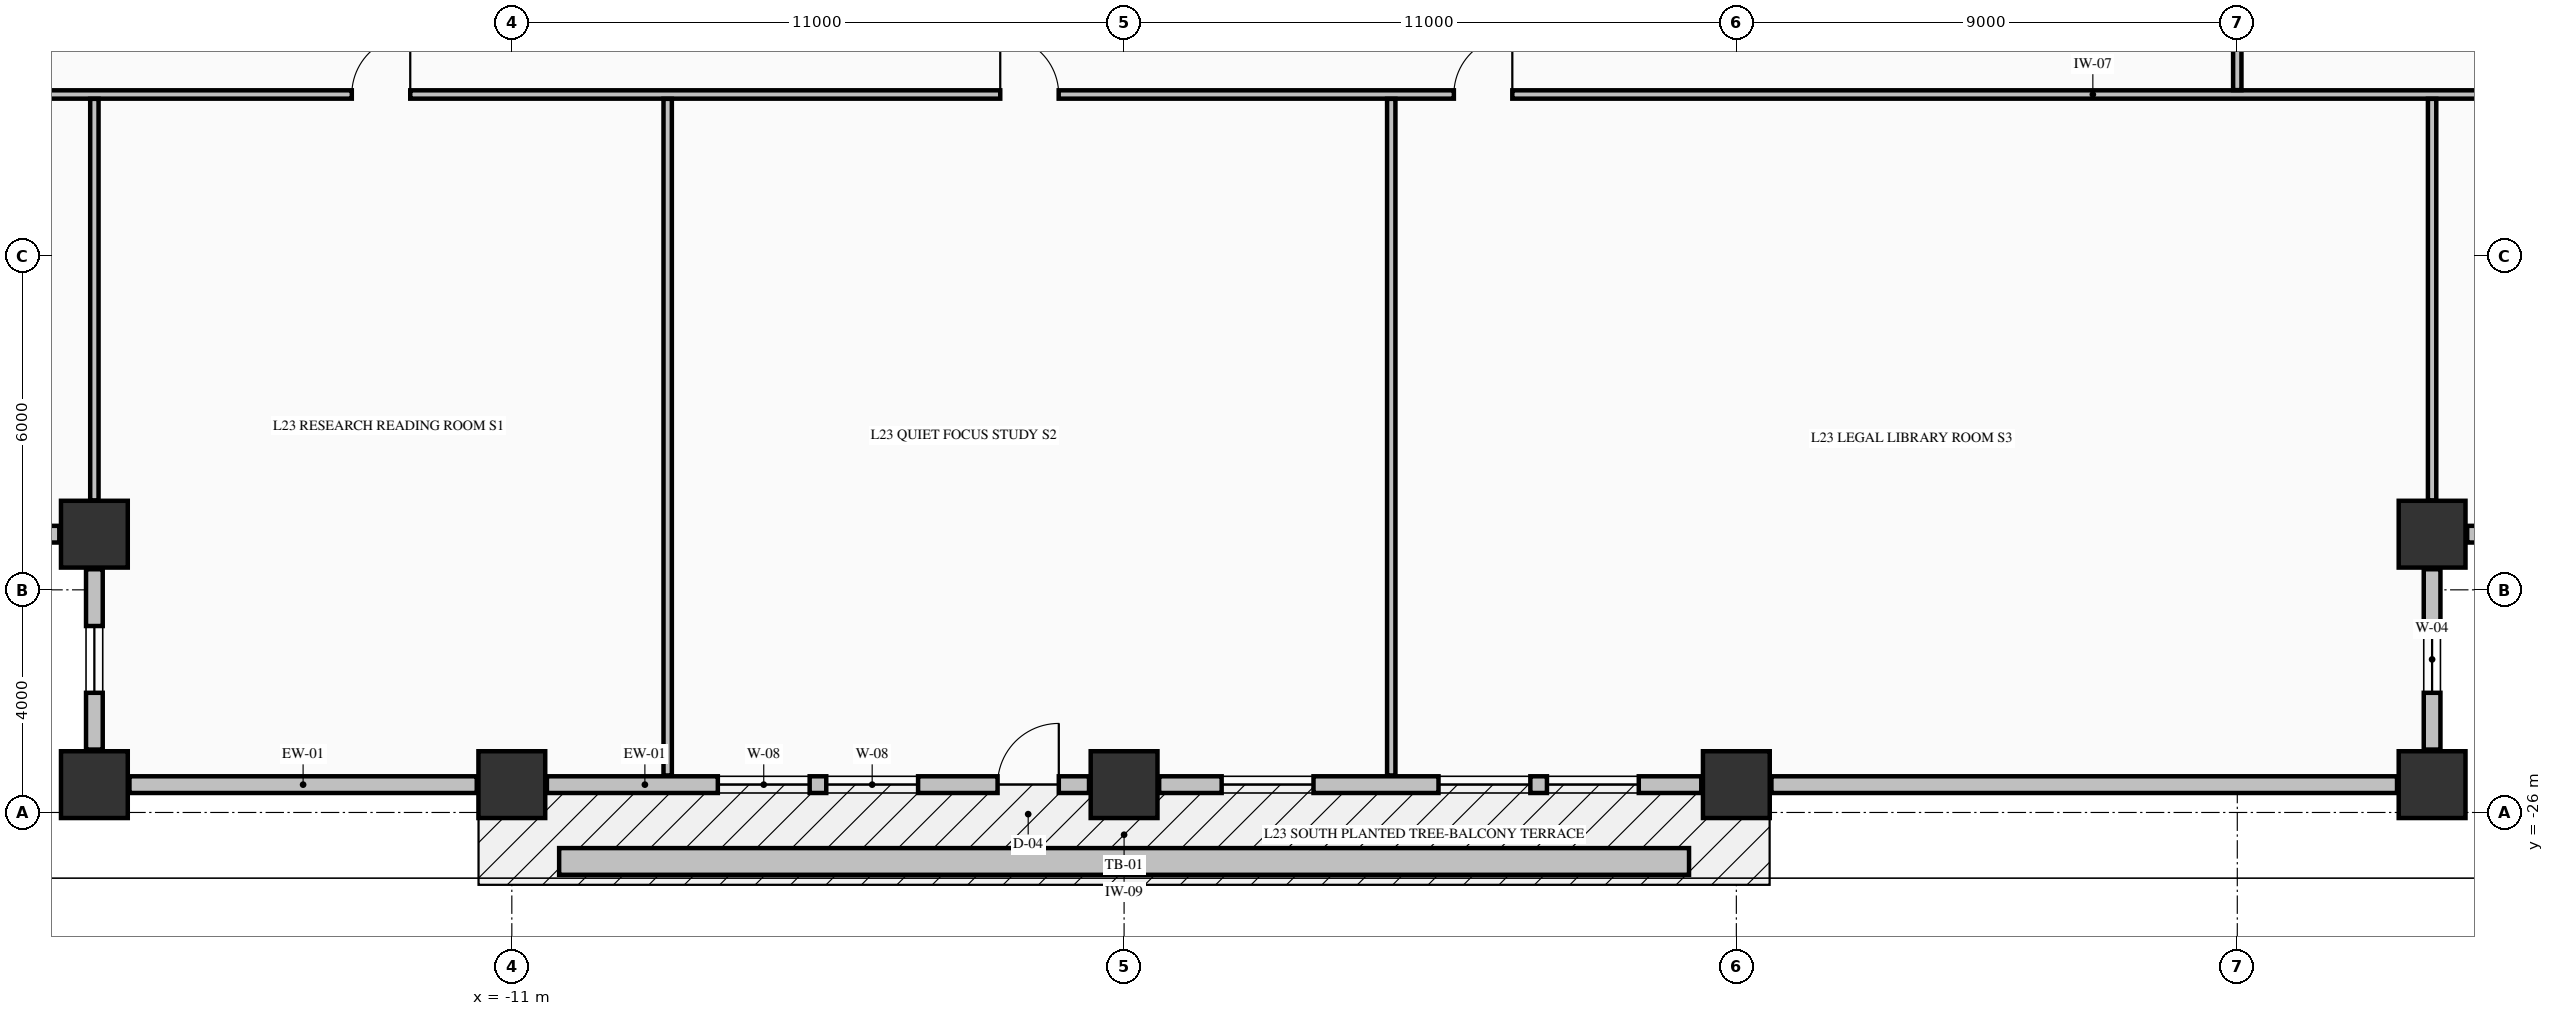
"""IFC4 building model, lengths in metres.
Left out: names, types, materials, properties, quantities, classifications, styles, units other than length and angle.
Written with IfcOpenShell. Run it as: python <this file> out.ifc"""

import sys

from ifc_helpers import new_model, si_unit, direction, frame, frame_2d, origin, origin_2d, place, context, subcontext, project, spatial, rectangle, extrude, element, fill, save


model = new_model("IFC4")
c1 = context("Model", 3, precision=1e-05, world=origin(), true_north=direction((0.0, 1.0)))
c2 = subcontext(c1, "Body", "Model", "MODEL_VIEW")
j1 = project(units=[si_unit("LENGTHUNIT", "METRE"), si_unit("PLANEANGLEUNIT", "RADIAN")], contexts=[c1])
p1 = place(None, origin())
s1 = spatial("IfcSite", under=j1, at=p1, CompositionType="ELEMENT")
p2 = place(p1, origin())
s2 = spatial("IfcBuilding", under=s1, at=p2, CompositionType="ELEMENT")
p3 = place(p2, frame((0.0, 0.0, 94.93)))
s3 = spatial("IfcBuildingStorey", under=s2, at=p3, CompositionType="ELEMENT", Elevation=94.93)
for number, where, z_axis, x_axis in (
    (1, (-18.5, -25.5, -0.25), (0.0, 0.0, 1.0), (1.0, 0.0, 0.0)),
    (2, (-11.0, -25.5, -0.25), (0.0, 0.0, 1.0), (1.0, 0.0, 0.0)),
    (3, (0.0, -25.5, -0.25), (0.0, 0.0, 1.0), (1.0, 0.0, 0.0)),
    (4, (11.0, -25.5, -0.25), (0.0, 0.0, 1.0), (1.0, 0.0, 0.0)),
    (5, (23.5, -25.5, -0.25), (0.0, 0.0, 1.0), (1.0, 0.0, 0.0)),
    (6, (-18.5, -21.0, -0.25), (0.0, 0.0, 1.0), (1.0, 0.0, 0.0)),
    (7, (23.5, -21.0, -0.25), (0.0, 0.0, 1.0), (1.0, 0.0, 0.0)),
):
    element("IfcColumn", number, at=place(p3, frame(where, z_axis=z_axis, x_axis=x_axis)), inside=s3, PredefinedType="COLUMN", context=c2, shape_type="SweptSolid", body=[
        extrude(rectangle(XDim=1.2, YDim=1.2, at=origin_2d()), origin(), (0.0, 0.0, 1.0), 3.545),
    ])
p4 = place(p3, frame((23.5, -24.87, 0.0), z_axis=(0.0, 0.0, 1.0), x_axis=(0.0, 1.0, 0.0)))
e8 = element("IfcWall", 8, at=p4, inside=s3, PredefinedType="STANDARD", context=c2, shape_type="SweptSolid", body=[
    extrude(rectangle(XDim=3.24, YDim=0.3, at=frame_2d((1.62, 0.0))), origin(), (0.0, 0.0, 1.0), 2.687),
])
p5 = place(p4, frame((1.02, 0.0, 0.82)))
e9 = element("IfcOpeningElement", 9, at=p5, cuts=e8, PredefinedType="OPENING", context=c2, shape_type="SweptSolid", body=[
    extrude(rectangle(XDim=1.2, YDim=1.65, at=frame_2d((0.6, 0.825))), frame((0.0, 0.16, 0.0), z_axis=(0.0, -1.0, 0.0), x_axis=(1.0, 0.0, 0.0)), (0.0, 0.0, 1.0), 0.32),
])
p6 = place(p3, frame((24.13, -21.0, 0.0), z_axis=(0.0, 0.0, 1.0), x_axis=(1.0, 0.0, 0.0)))
e10 = element("IfcWall", 10, at=p6, inside=s3, PredefinedType="STANDARD", context=c2, shape_type="SweptSolid", body=[
    extrude(rectangle(XDim=3.24, YDim=0.3, at=frame_2d((1.62, 0.0))), origin(), (0.0, 0.0, 1.0), 2.687),
])
p7 = place(p6, frame((1.02, 0.0, 0.82)))
e11 = element("IfcOpeningElement", 11, at=p7, cuts=e10, PredefinedType="OPENING", context=c2, shape_type="SweptSolid", body=[
    extrude(rectangle(XDim=1.2, YDim=1.65, at=frame_2d((0.6, 0.825))), frame((0.0, 0.16, 0.0), z_axis=(0.0, -1.0, 0.0), x_axis=(1.0, 0.0, 0.0)), (0.0, 0.0, 1.0), 0.32),
])
p8 = place(p3, frame((-22.37, -21.0, 0.0), z_axis=(0.0, 0.0, 1.0), x_axis=(1.0, 0.0, 0.0)))
e12 = element("IfcWall", 12, at=p8, inside=s3, PredefinedType="STANDARD", context=c2, shape_type="SweptSolid", body=[
    extrude(rectangle(XDim=3.24, YDim=0.3, at=frame_2d((1.62, 0.0))), origin(), (0.0, 0.0, 1.0), 2.687),
])
p9 = place(p8, frame((1.02, 0.0, 0.82)))
e13 = element("IfcOpeningElement", 13, at=p9, cuts=e12, PredefinedType="OPENING", context=c2, shape_type="SweptSolid", body=[
    extrude(rectangle(XDim=1.2, YDim=1.65, at=frame_2d((0.6, 0.825))), frame((0.0, 0.16, 0.0), z_axis=(0.0, -1.0, 0.0), x_axis=(1.0, 0.0, 0.0)), (0.0, 0.0, 1.0), 0.32),
])
p10 = place(p3, frame((-18.5, -21.63, 0.0), z_axis=(0.0, 0.0, 1.0), x_axis=(0.0, -1.0, 0.0)))
e14 = element("IfcWall", 14, at=p10, inside=s3, PredefinedType="STANDARD", context=c2, shape_type="SweptSolid", body=[
    extrude(rectangle(XDim=3.24, YDim=0.3, at=frame_2d((1.62, 0.0))), origin(), (0.0, 0.0, 1.0), 2.687),
])
p11 = place(p10, frame((1.02, 0.0, 0.82)))
e15 = element("IfcOpeningElement", 15, at=p11, cuts=e14, PredefinedType="OPENING", context=c2, shape_type="SweptSolid", body=[
    extrude(rectangle(XDim=1.2, YDim=1.65, at=frame_2d((0.6, 0.825))), frame((0.0, 0.16, 0.0), z_axis=(0.0, -1.0, 0.0), x_axis=(1.0, 0.0, 0.0)), (0.0, 0.0, 1.0), 0.32),
])
p12 = place(p3, frame((-17.87, -25.5, 0.0), z_axis=(0.0, 0.0, 1.0), x_axis=(1.0, 0.0, 0.0)))
e16 = element("IfcWall", 16, at=p12, inside=s3, PredefinedType="STANDARD", context=c2, shape_type="SweptSolid", body=[
    extrude(rectangle(XDim=6.24, YDim=0.3, at=frame_2d((3.12, 0.0))), origin(), (0.0, 0.0, 1.0), 2.687),
])
p13 = place(p3, frame((-10.37, -25.5, 0.0), z_axis=(0.0, 0.0, 1.0), x_axis=(1.0, 0.0, 0.0)))
e17 = element("IfcWall", 17, at=p13, inside=s3, PredefinedType="STANDARD", context=c2, shape_type="SweptSolid", body=[
    extrude(rectangle(XDim=9.74, YDim=0.3, at=frame_2d((4.87, 0.0))), origin(), (0.0, 0.0, 1.0), 2.687),
])
p14 = place(p13, frame((8.097, 0.0, 0.0)))
e18 = element("IfcOpeningElement", 18, at=p14, cuts=e17, PredefinedType="OPENING", context=c2, shape_type="SweptSolid", body=[
    extrude(rectangle(XDim=1.1, YDim=2.15, at=frame_2d((0.55, 1.075))), frame((0.0, 0.16, 0.0), z_axis=(0.0, -1.0, 0.0), x_axis=(1.0, 0.0, 0.0)), (0.0, 0.0, 1.0), 0.32),
])
p15 = place(p13, frame((3.071, 0.0, 0.8)))
e19 = element("IfcOpeningElement", 19, at=p15, cuts=e17, PredefinedType="OPENING", context=c2, shape_type="SweptSolid", body=[
    extrude(rectangle(XDim=1.65, YDim=1.7, at=frame_2d((0.825, 0.85))), frame((0.0, 0.16, 0.0), z_axis=(0.0, -1.0, 0.0), x_axis=(1.0, 0.0, 0.0)), (0.0, 0.0, 1.0), 0.32),
])
p16 = place(p13, frame((5.019, 0.0, 0.8)))
e20 = element("IfcOpeningElement", 20, at=p16, cuts=e17, PredefinedType="OPENING", context=c2, shape_type="SweptSolid", body=[
    extrude(rectangle(XDim=1.65, YDim=1.7, at=frame_2d((0.825, 0.85))), frame((0.0, 0.16, 0.0), z_axis=(0.0, -1.0, 0.0), x_axis=(1.0, 0.0, 0.0)), (0.0, 0.0, 1.0), 0.32),
])
p17 = place(p3, frame((0.63, -25.5, 0.0), z_axis=(0.0, 0.0, 1.0), x_axis=(1.0, 0.0, 0.0)))
e21 = element("IfcWall", 21, at=p17, inside=s3, PredefinedType="STANDARD", context=c2, shape_type="SweptSolid", body=[
    extrude(rectangle(XDim=9.74, YDim=0.3, at=frame_2d((4.87, 0.0))), origin(), (0.0, 0.0, 1.0), 2.687),
])
p18 = place(p17, frame((1.123, 0.0, 0.8)))
e22 = element("IfcOpeningElement", 22, at=p18, cuts=e21, PredefinedType="OPENING", context=c2, shape_type="SweptSolid", body=[
    extrude(rectangle(XDim=1.65, YDim=1.7, at=frame_2d((0.825, 0.85))), frame((0.0, 0.16, 0.0), z_axis=(0.0, -1.0, 0.0), x_axis=(1.0, 0.0, 0.0)), (0.0, 0.0, 1.0), 0.32),
])
p19 = place(p17, frame((5.019, 0.0, 0.8)))
e23 = element("IfcOpeningElement", 23, at=p19, cuts=e21, PredefinedType="OPENING", context=c2, shape_type="SweptSolid", body=[
    extrude(rectangle(XDim=1.65, YDim=1.7, at=frame_2d((0.825, 0.85))), frame((0.0, 0.16, 0.0), z_axis=(0.0, -1.0, 0.0), x_axis=(1.0, 0.0, 0.0)), (0.0, 0.0, 1.0), 0.32),
])
p20 = place(p17, frame((6.967, 0.0, 0.8)))
e24 = element("IfcOpeningElement", 24, at=p20, cuts=e21, PredefinedType="OPENING", context=c2, shape_type="SweptSolid", body=[
    extrude(rectangle(XDim=1.65, YDim=1.7, at=frame_2d((0.825, 0.85))), frame((0.0, 0.16, 0.0), z_axis=(0.0, -1.0, 0.0), x_axis=(1.0, 0.0, 0.0)), (0.0, 0.0, 1.0), 0.32),
])
p21 = place(p3, frame((11.63, -25.5, 0.0), z_axis=(0.0, 0.0, 1.0), x_axis=(1.0, 0.0, 0.0)))
e25 = element("IfcWall", 25, at=p21, inside=s3, PredefinedType="STANDARD", context=c2, shape_type="SweptSolid", body=[
    extrude(rectangle(XDim=11.24, YDim=0.3, at=frame_2d((5.62, 0.0))), origin(), (0.0, 0.0, 1.0), 2.687),
])
p22 = place(p3, frame((-22.835, -13.1, 0.0), z_axis=(0.0, 0.0, 1.0), x_axis=(1.0, 0.0, 0.0)))
e26 = element("IfcWall", 26, at=p22, inside=s3, PredefinedType="PARTITIONING", context=c2, shape_type="SweptSolid", body=[
    extrude(rectangle(XDim=50.67, YDim=0.15, at=frame_2d((25.335, 0.0))), origin(), (0.0, 0.0, 1.0), 3.295),
])
p23 = place(p22, frame((8.96, 0.0, 0.0)))
e27 = element("IfcOpeningElement", 27, at=p23, cuts=e26, PredefinedType="OPENING", context=c2, shape_type="SweptSolid", body=[
    extrude(rectangle(XDim=1.05, YDim=2.15, at=frame_2d((0.525, 1.075))), frame((0.0, 0.085, 0.0), z_axis=(0.0, -1.0, 0.0), x_axis=(1.0, 0.0, 0.0)), (0.0, 0.0, 1.0), 0.17),
])
p24 = place(p22, frame((20.61, 0.0, 0.0)))
e28 = element("IfcOpeningElement", 28, at=p24, cuts=e26, PredefinedType="OPENING", context=c2, shape_type="SweptSolid", body=[
    extrude(rectangle(XDim=1.05, YDim=2.15, at=frame_2d((0.525, 1.075))), frame((0.0, 0.085, 0.0), z_axis=(0.0, -1.0, 0.0), x_axis=(1.0, 0.0, 0.0)), (0.0, 0.0, 1.0), 0.17),
])
p25 = place(p22, frame((28.76, 0.0, 0.0)))
e29 = element("IfcOpeningElement", 29, at=p25, cuts=e26, PredefinedType="OPENING", context=c2, shape_type="SweptSolid", body=[
    extrude(rectangle(XDim=1.05, YDim=2.15, at=frame_2d((0.525, 1.075))), frame((0.0, 0.085, 0.0), z_axis=(0.0, -1.0, 0.0), x_axis=(1.0, 0.0, 0.0)), (0.0, 0.0, 1.0), 0.17),
])
p26 = place(p3, frame((-18.5, -20.394, 0.0), z_axis=(0.0, 0.0, 1.0), x_axis=(0.0, 1.0, 0.0)))
e30 = element("IfcWall", 30, at=p26, inside=s3, PredefinedType="PARTITIONING", context=c2, shape_type="SweptSolid", body=[
    extrude(rectangle(XDim=7.216, YDim=0.15, at=frame_2d((3.608, 0.0))), origin(), (0.0, 0.0, 1.0), 3.295),
])
for number, where, z_axis, x_axis in (
    (31, (-8.2, -25.335, 0.0), (0.0, 0.0, 1.0), (0.0, 1.0, 0.0)),
    (32, (4.8, -25.335, 0.0), (0.0, 0.0, 1.0), (0.0, 1.0, 0.0)),
):
    element("IfcWall", number, at=place(p3, frame(where, z_axis=z_axis, x_axis=x_axis)), inside=s3, PredefinedType="PARTITIONING", context=c2, shape_type="SweptSolid", body=[
        extrude(rectangle(XDim=12.157, YDim=0.15, at=frame_2d((6.079, 0.0))), origin(), (0.0, 0.0, 1.0), 3.295),
    ])
p27 = place(p3, frame((20.0, -13.022, 0.0), z_axis=(0.0, 0.0, 1.0), x_axis=(0.0, 1.0, 0.0)))
e33 = element("IfcWall", 33, at=p27, inside=s3, PredefinedType="PARTITIONING", context=c2, shape_type="SweptSolid", body=[
    extrude(rectangle(XDim=2.566, YDim=0.15, at=frame_2d((1.283, 0.0))), origin(), (0.0, 0.0, 1.0), 2.785),
])
p28 = place(p27, frame((1.027, 0.0, 0.0)))
e34 = element("IfcOpeningElement", 34, at=p28, cuts=e33, PredefinedType="OPENING", context=c2, shape_type="SweptSolid", body=[
    extrude(rectangle(XDim=0.95, YDim=2.15, at=frame_2d((0.475, 1.075))), frame((0.0, 0.085, 0.0), z_axis=(0.0, -1.0, 0.0), x_axis=(1.0, 0.0, 0.0)), (0.0, 0.0, 1.0), 0.17),
])
p29 = place(p3, frame((23.5, -20.394, 0.0), z_axis=(0.0, 0.0, 1.0), x_axis=(0.0, 1.0, 0.0)))
e35 = element("IfcWall", 35, at=p29, inside=s3, PredefinedType="PARTITIONING", context=c2, shape_type="SweptSolid", body=[
    extrude(rectangle(XDim=7.216, YDim=0.15, at=frame_2d((3.608, 0.0))), origin(), (0.0, 0.0, 1.0), 3.295),
])
p30 = place(p3, frame((-10.15, -26.88, -0.04), z_axis=(0.0, 0.0, 1.0), x_axis=(1.0, 0.0, 0.0)))
e36 = element("IfcWall", 36, at=p30, inside=s3, PredefinedType="PARAPET", context=c2, shape_type="SweptSolid", body=[
    extrude(rectangle(XDim=20.3, YDim=0.48, at=frame_2d((10.15, 0.0))), origin(), (0.0, 0.0, 1.0), 0.52),
])
p31 = place(p5, origin())
e37 = element("IfcWindow", 37, at=p31, inside=s3, PartitioningType="SINGLE_PANEL", PredefinedType="WINDOW", context=c2, shape_type="SweptSolid", body=[
    extrude(rectangle(XDim=1.2, YDim=1.65, at=frame_2d((0.6, 0.825))), frame((0.0, 0.03, 0.0), z_axis=(0.0, -1.0, 0.0), x_axis=(1.0, 0.0, 0.0)), (0.0, 0.0, 1.0), 0.06),
])
fill(e9, e37)
p32 = place(p11, origin())
e38 = element("IfcWindow", 38, at=p32, inside=s3, PartitioningType="SINGLE_PANEL", PredefinedType="WINDOW", context=c2, shape_type="SweptSolid", body=[
    extrude(rectangle(XDim=1.2, YDim=1.65, at=frame_2d((0.6, 0.825))), frame((0.0, 0.03, 0.0), z_axis=(0.0, -1.0, 0.0), x_axis=(1.0, 0.0, 0.0)), (0.0, 0.0, 1.0), 0.06),
])
fill(e15, e38)
p33 = place(p14, origin())
e39 = element("IfcDoor", 39, at=p33, inside=s3, OperationType="SINGLE_SWING_RIGHT", PredefinedType="DOOR", context=c2, shape_type="SweptSolid", body=[
    extrude(rectangle(XDim=1.1, YDim=2.15, at=frame_2d((0.55, 1.075))), frame((0.0, 0.025, 0.0), z_axis=(0.0, -1.0, 0.0), x_axis=(1.0, 0.0, 0.0)), (0.0, 0.0, 1.0), 0.05),
])
fill(e18, e39)
p34 = place(p15, origin())
e40 = element("IfcWindow", 40, at=p34, inside=s3, PartitioningType="SINGLE_PANEL", PredefinedType="WINDOW", context=c2, shape_type="SweptSolid", body=[
    extrude(rectangle(XDim=1.65, YDim=1.7, at=frame_2d((0.825, 0.85))), frame((0.0, 0.03, 0.0), z_axis=(0.0, -1.0, 0.0), x_axis=(1.0, 0.0, 0.0)), (0.0, 0.0, 1.0), 0.06),
])
fill(e19, e40)
p35 = place(p16, origin())
e41 = element("IfcWindow", 41, at=p35, inside=s3, PartitioningType="SINGLE_PANEL", PredefinedType="WINDOW", context=c2, shape_type="SweptSolid", body=[
    extrude(rectangle(XDim=1.65, YDim=1.7, at=frame_2d((0.825, 0.85))), frame((0.0, 0.03, 0.0), z_axis=(0.0, -1.0, 0.0), x_axis=(1.0, 0.0, 0.0)), (0.0, 0.0, 1.0), 0.06),
])
fill(e20, e41)
p36 = place(p18, origin())
e42 = element("IfcWindow", 42, at=p36, inside=s3, PartitioningType="SINGLE_PANEL", PredefinedType="WINDOW", context=c2, shape_type="SweptSolid", body=[
    extrude(rectangle(XDim=1.65, YDim=1.7, at=frame_2d((0.825, 0.85))), frame((0.0, 0.03, 0.0), z_axis=(0.0, -1.0, 0.0), x_axis=(1.0, 0.0, 0.0)), (0.0, 0.0, 1.0), 0.06),
])
fill(e22, e42)
p37 = place(p19, origin())
e43 = element("IfcWindow", 43, at=p37, inside=s3, PartitioningType="SINGLE_PANEL", PredefinedType="WINDOW", context=c2, shape_type="SweptSolid", body=[
    extrude(rectangle(XDim=1.65, YDim=1.7, at=frame_2d((0.825, 0.85))), frame((0.0, 0.03, 0.0), z_axis=(0.0, -1.0, 0.0), x_axis=(1.0, 0.0, 0.0)), (0.0, 0.0, 1.0), 0.06),
])
fill(e23, e43)
p38 = place(p20, origin())
e44 = element("IfcWindow", 44, at=p38, inside=s3, PartitioningType="SINGLE_PANEL", PredefinedType="WINDOW", context=c2, shape_type="SweptSolid", body=[
    extrude(rectangle(XDim=1.65, YDim=1.7, at=frame_2d((0.825, 0.85))), frame((0.0, 0.03, 0.0), z_axis=(0.0, -1.0, 0.0), x_axis=(1.0, 0.0, 0.0)), (0.0, 0.0, 1.0), 0.06),
])
fill(e24, e44)
p39 = place(p23, origin())
e45 = element("IfcDoor", 45, at=p39, inside=s3, OperationType="SINGLE_SWING_RIGHT", PredefinedType="DOOR", context=c2, shape_type="SweptSolid", body=[
    extrude(rectangle(XDim=1.05, YDim=2.15, at=frame_2d((0.525, 1.075))), frame((0.0, 0.025, 0.0), z_axis=(0.0, -1.0, 0.0), x_axis=(1.0, 0.0, 0.0)), (0.0, 0.0, 1.0), 0.05),
])
fill(e27, e45)
p40 = place(p24, origin())
e46 = element("IfcDoor", 46, at=p40, inside=s3, OperationType="SINGLE_SWING_LEFT", PredefinedType="DOOR", context=c2, shape_type="SweptSolid", body=[
    extrude(rectangle(XDim=1.05, YDim=2.15, at=frame_2d((0.525, 1.075))), frame((0.0, 0.025, 0.0), z_axis=(0.0, -1.0, 0.0), x_axis=(1.0, 0.0, 0.0)), (0.0, 0.0, 1.0), 0.05),
])
fill(e28, e46)
p41 = place(p25, origin())
e47 = element("IfcDoor", 47, at=p41, inside=s3, OperationType="SINGLE_SWING_RIGHT", PredefinedType="DOOR", context=c2, shape_type="SweptSolid", body=[
    extrude(rectangle(XDim=1.05, YDim=2.15, at=frame_2d((0.525, 1.075))), frame((0.0, 0.025, 0.0), z_axis=(0.0, -1.0, 0.0), x_axis=(1.0, 0.0, 0.0)), (0.0, 0.0, 1.0), 0.05),
])
fill(e29, e47)
save(model, sys.argv[1])
